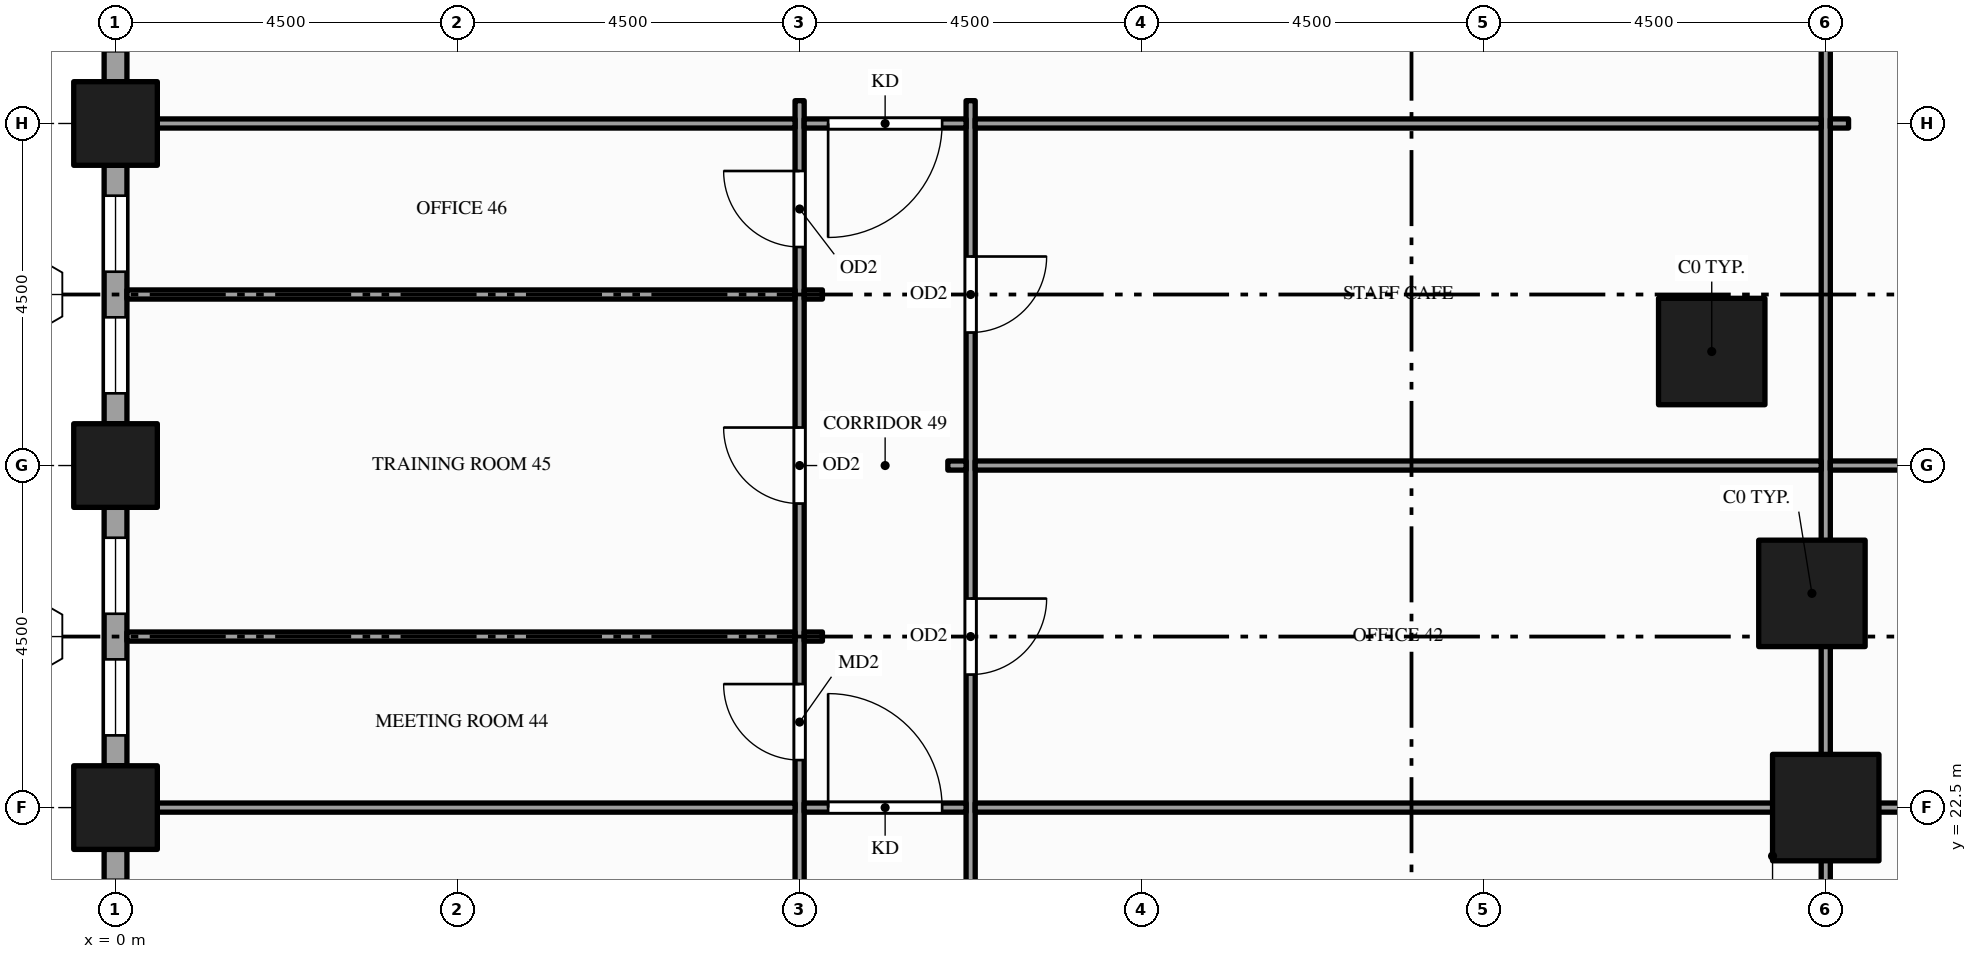
"""IFC4 building model, lengths in metres.
Left out: names, types, materials, properties, quantities, classifications, styles, units other than length and angle.
Written with IfcOpenShell. Run it as: python <this file> out.ifc"""

import sys

from ifc_helpers import new_model, si_unit, direction, frame, frame_2d, origin, origin_2d, place, context, subcontext, project, spatial, rectangle, hollow_rectangle, extrude, element, fill, save


model = new_model("IFC4")
c1 = context("Model", 3, precision=1e-05, world=origin(), true_north=direction((0.0, 1.0)))
c2 = subcontext(c1, "Body", "Model", "MODEL_VIEW")
j1 = project(units=[si_unit("LENGTHUNIT", "METRE"), si_unit("PLANEANGLEUNIT", "RADIAN")], contexts=[c1])
p1 = place(None, origin())
s1 = spatial("IfcSite", under=j1, at=p1, CompositionType="ELEMENT")
p2 = place(p1, origin())
s2 = spatial("IfcBuilding", under=s1, at=p2, CompositionType="ELEMENT")
p3 = place(p2, frame((0.0, 0.0, 8.0)))
s3 = spatial("IfcBuildingStorey", under=s2, at=p3, CompositionType="ELEMENT", Elevation=8.0)
for number, where, z_axis, x_axis in (
    (1, (0.0, 22.5, -0.25), (0.0, 0.0, 1.0), (1.0, 0.0, 0.0)),
    (2, (0.0, 27.0, -0.25), (0.0, 0.0, 1.0), (1.0, 0.0, 0.0)),
    (3, (0.0, 31.5, -0.25), (0.0, 0.0, 1.0), (1.0, 0.0, 0.0)),
):
    element("IfcColumn", number, at=place(p3, frame(where, z_axis=z_axis, x_axis=x_axis)), inside=s3, PredefinedType="COLUMN", context=c2, shape_type="SweptSolid", body=[
        extrude(hollow_rectangle(XDim=1.1, YDim=1.1, WallThickness=0.06, at=origin_2d()), origin(), (0.0, 0.0, 1.0), 6.0),
    ])
for number, where, z_axis, x_axis in (
    (4, (21.0, 28.5, -0.25), (0.0, 0.0, 1.0), (1.0, 0.0, 0.0)),
    (5, (22.318, 25.318, -0.25), (0.0, 0.0, 1.0), (1.0, 0.0, 0.0)),
    (6, (22.5, 22.5, -0.25), (0.0, 0.0, 1.0), (1.0, 0.0, 0.0)),
):
    element("IfcColumn", number, at=place(p3, frame(where, z_axis=z_axis, x_axis=x_axis)), inside=s3, PredefinedType="COLUMN", context=c2, shape_type="SweptSolid", body=[
        extrude(hollow_rectangle(XDim=1.4, YDim=1.4, WallThickness=0.08, at=origin_2d()), origin(), (0.0, 0.0, 1.0), 6.0),
    ])
p4 = place(p3, frame((0.0, 35.999, 0.0), z_axis=(0.0, 0.0, 1.0), x_axis=(0.0, -1.0, 0.0)))
e7 = element("IfcWall", 7, at=p4, inside=s3, PredefinedType="STANDARD", context=c2, shape_type="SweptSolid", body=[
    extrude(rectangle(XDim=3.949, YDim=0.3, at=frame_2d((1.975, 0.0))), origin(), (0.0, 0.0, 1.0), 5.036),
])
p5 = place(p4, frame((0.425, 0.0, 0.9)))
e8 = element("IfcOpeningElement", 8, at=p5, cuts=e7, PredefinedType="OPENING", context=c2, shape_type="SweptSolid", body=[
    extrude(rectangle(XDim=1.5, YDim=3.5, at=frame_2d((0.75, 1.75))), frame((0.0, 0.16, 0.0), z_axis=(0.0, -1.0, 0.0), x_axis=(1.0, 0.0, 0.0)), (0.0, 0.0, 1.0), 0.32),
])
p6 = place(p4, frame((2.549, 0.0, 0.9)))
e9 = element("IfcOpeningElement", 9, at=p6, cuts=e7, PredefinedType="OPENING", context=c2, shape_type="SweptSolid", body=[
    extrude(rectangle(XDim=1.0, YDim=3.5, at=frame_2d((0.5, 1.75))), frame((0.0, 0.16, 0.0), z_axis=(0.0, -1.0, 0.0), x_axis=(1.0, 0.0, 0.0)), (0.0, 0.0, 1.0), 0.32),
])
p7 = place(p3, frame((0.0, 30.95, 0.0), z_axis=(0.0, 0.0, 1.0), x_axis=(0.0, -1.0, 0.0)))
e10 = element("IfcWall", 10, at=p7, inside=s3, PredefinedType="STANDARD", context=c2, shape_type="SweptSolid", body=[
    extrude(rectangle(XDim=3.4, YDim=0.3, at=frame_2d((1.7, 0.0))), origin(), (0.0, 0.0, 1.0), 5.036),
])
p8 = place(p7, frame((0.4, 0.0, 0.9)))
e11 = element("IfcOpeningElement", 11, at=p8, cuts=e10, PredefinedType="OPENING", context=c2, shape_type="SweptSolid", body=[
    extrude(rectangle(XDim=1.0, YDim=3.5, at=frame_2d((0.5, 1.75))), frame((0.0, 0.16, 0.0), z_axis=(0.0, -1.0, 0.0), x_axis=(1.0, 0.0, 0.0)), (0.0, 0.0, 1.0), 0.32),
])
p9 = place(p7, frame((2.0, 0.0, 0.9)))
e12 = element("IfcOpeningElement", 12, at=p9, cuts=e10, PredefinedType="OPENING", context=c2, shape_type="SweptSolid", body=[
    extrude(rectangle(XDim=1.0, YDim=3.5, at=frame_2d((0.5, 1.75))), frame((0.0, 0.16, 0.0), z_axis=(0.0, -1.0, 0.0), x_axis=(1.0, 0.0, 0.0)), (0.0, 0.0, 1.0), 0.32),
])
p10 = place(p3, frame((0.0, 26.45, 0.0), z_axis=(0.0, 0.0, 1.0), x_axis=(0.0, -1.0, 0.0)))
e13 = element("IfcWall", 13, at=p10, inside=s3, PredefinedType="STANDARD", context=c2, shape_type="SweptSolid", body=[
    extrude(rectangle(XDim=3.4, YDim=0.3, at=frame_2d((1.7, 0.0))), origin(), (0.0, 0.0, 1.0), 5.036),
])
p11 = place(p10, frame((0.4, 0.0, 0.9)))
e14 = element("IfcOpeningElement", 14, at=p11, cuts=e13, PredefinedType="OPENING", context=c2, shape_type="SweptSolid", body=[
    extrude(rectangle(XDim=1.0, YDim=3.5, at=frame_2d((0.5, 1.75))), frame((0.0, 0.16, 0.0), z_axis=(0.0, -1.0, 0.0), x_axis=(1.0, 0.0, 0.0)), (0.0, 0.0, 1.0), 0.32),
])
p12 = place(p10, frame((2.0, 0.0, 0.9)))
e15 = element("IfcOpeningElement", 15, at=p12, cuts=e13, PredefinedType="OPENING", context=c2, shape_type="SweptSolid", body=[
    extrude(rectangle(XDim=1.0, YDim=3.5, at=frame_2d((0.5, 1.75))), frame((0.0, 0.16, 0.0), z_axis=(0.0, -1.0, 0.0), x_axis=(1.0, 0.0, 0.0)), (0.0, 0.0, 1.0), 0.32),
])
p13 = place(p3, frame((0.0, 21.95, 0.0), z_axis=(0.0, 0.0, 1.0), x_axis=(0.0, -1.0, 0.0)))
e16 = element("IfcWall", 16, at=p13, inside=s3, PredefinedType="STANDARD", context=c2, shape_type="SweptSolid", body=[
    extrude(rectangle(XDim=3.4, YDim=0.3, at=frame_2d((1.7, 0.0))), origin(), (0.0, 0.0, 1.0), 5.036),
])
p14 = place(p13, frame((0.4, 0.0, 0.9)))
e17 = element("IfcOpeningElement", 17, at=p14, cuts=e16, PredefinedType="OPENING", context=c2, shape_type="SweptSolid", body=[
    extrude(rectangle(XDim=1.0, YDim=3.5, at=frame_2d((0.5, 1.75))), frame((0.0, 0.16, 0.0), z_axis=(0.0, -1.0, 0.0), x_axis=(1.0, 0.0, 0.0)), (0.0, 0.0, 1.0), 0.32),
])
p15 = place(p13, frame((2.0, 0.0, 0.9)))
e18 = element("IfcOpeningElement", 18, at=p15, cuts=e16, PredefinedType="OPENING", context=c2, shape_type="SweptSolid", body=[
    extrude(rectangle(XDim=1.0, YDim=3.5, at=frame_2d((0.5, 1.75))), frame((0.0, 0.16, 0.0), z_axis=(0.0, -1.0, 0.0), x_axis=(1.0, 0.0, 0.0)), (0.0, 0.0, 1.0), 0.32),
])
p16 = place(p3, frame((9.0, 10.95, 0.0), z_axis=(0.0, 0.0, 1.0), x_axis=(0.0, 1.0, 0.0)))
e19 = element("IfcWall", 19, at=p16, inside=s3, PredefinedType="PARTITIONING", context=c2, shape_type="SweptSolid", body=[
    extrude(rectangle(XDim=20.85, YDim=0.12, at=frame_2d((10.425, 0.0))), origin(), (0.0, 0.0, 1.0), 4.5),
])
p17 = place(p16, frame((12.175, 0.0, 0.0)))
e20 = element("IfcOpeningElement", 20, at=p17, cuts=e19, PredefinedType="OPENING", context=c2, shape_type="SweptSolid", body=[
    extrude(rectangle(XDim=1.0, YDim=2.1, at=frame_2d((0.5, 1.05))), frame((0.0, 0.07, 0.0), z_axis=(0.0, -1.0, 0.0), x_axis=(1.0, 0.0, 0.0)), (0.0, 0.0, 1.0), 0.14),
])
p18 = place(p16, frame((15.55, 0.0, 0.0)))
e21 = element("IfcOpeningElement", 21, at=p18, cuts=e19, PredefinedType="OPENING", context=c2, shape_type="SweptSolid", body=[
    extrude(rectangle(XDim=1.0, YDim=2.1, at=frame_2d((0.5, 1.05))), frame((0.0, 0.07, 0.0), z_axis=(0.0, -1.0, 0.0), x_axis=(1.0, 0.0, 0.0)), (0.0, 0.0, 1.0), 0.14),
])
p19 = place(p16, frame((18.925, 0.0, 0.0)))
e22 = element("IfcOpeningElement", 22, at=p19, cuts=e19, PredefinedType="OPENING", context=c2, shape_type="SweptSolid", body=[
    extrude(rectangle(XDim=1.0, YDim=2.1, at=frame_2d((0.5, 1.05))), frame((0.0, 0.07, 0.0), z_axis=(0.0, -1.0, 0.0), x_axis=(1.0, 0.0, 0.0)), (0.0, 0.0, 1.0), 0.14),
])
p20 = place(p3, frame((11.25, 10.95, 0.0), z_axis=(0.0, 0.0, 1.0), x_axis=(0.0, 1.0, 0.0)))
e23 = element("IfcWall", 23, at=p20, inside=s3, PredefinedType="PARTITIONING", context=c2, shape_type="SweptSolid", body=[
    extrude(rectangle(XDim=20.85, YDim=0.12, at=frame_2d((10.425, 0.0))), origin(), (0.0, 0.0, 1.0), 4.5),
])
p21 = place(p20, frame((5.425, 0.0, 0.0)))
e24 = element("IfcOpeningElement", 24, at=p21, cuts=e23, PredefinedType="OPENING", context=c2, shape_type="SweptSolid", body=[
    extrude(rectangle(XDim=1.0, YDim=2.1, at=frame_2d((0.5, 1.05))), frame((0.0, 0.07, 0.0), z_axis=(0.0, -1.0, 0.0), x_axis=(1.0, 0.0, 0.0)), (0.0, 0.0, 1.0), 0.14),
])
p22 = place(p20, frame((13.3, 0.0, 0.0)))
e25 = element("IfcOpeningElement", 25, at=p22, cuts=e23, PredefinedType="OPENING", context=c2, shape_type="SweptSolid", body=[
    extrude(rectangle(XDim=1.0, YDim=2.1, at=frame_2d((0.5, 1.05))), frame((0.0, 0.07, 0.0), z_axis=(0.0, -1.0, 0.0), x_axis=(1.0, 0.0, 0.0)), (0.0, 0.0, 1.0), 0.14),
])
p23 = place(p20, frame((17.8, 0.0, 0.0)))
e26 = element("IfcOpeningElement", 26, at=p23, cuts=e23, PredefinedType="OPENING", context=c2, shape_type="SweptSolid", body=[
    extrude(rectangle(XDim=1.0, YDim=2.1, at=frame_2d((0.5, 1.05))), frame((0.0, 0.07, 0.0), z_axis=(0.0, -1.0, 0.0), x_axis=(1.0, 0.0, 0.0)), (0.0, 0.0, 1.0), 0.14),
])
p24 = place(p3, frame((22.5, 0.15, 0.0), z_axis=(0.0, 0.0, 1.0), x_axis=(0.0, 1.0, 0.0)))
e27 = element("IfcWall", 27, at=p24, inside=s3, PredefinedType="PARTITIONING", context=c2, shape_type="SweptSolid", body=[
    extrude(rectangle(XDim=35.95, YDim=0.12, at=frame_2d((17.975, 0.0))), origin(), (0.0, 0.0, 1.0), 4.759),
])
p25 = place(p24, frame((9.225, 0.0, 0.0)))
e28 = element("IfcOpeningElement", 28, at=p25, cuts=e27, PredefinedType="OPENING", context=c2, shape_type="SweptSolid", body=[
    extrude(rectangle(XDim=1.5, YDim=2.1, at=frame_2d((0.75, 1.05))), frame((0.0, 0.07, 0.0), z_axis=(0.0, -1.0, 0.0), x_axis=(1.0, 0.0, 0.0)), (0.0, 0.0, 1.0), 0.14),
])
p26 = place(p24, frame((32.7, 0.0, 0.0)))
e29 = element("IfcOpeningElement", 29, at=p26, cuts=e27, PredefinedType="OPENING", context=c2, shape_type="SweptSolid", body=[
    extrude(rectangle(XDim=1.8, YDim=2.1, at=frame_2d((0.9, 1.05))), frame((0.0, 0.07, 0.0), z_axis=(0.0, -1.0, 0.0), x_axis=(1.0, 0.0, 0.0)), (0.0, 0.0, 1.0), 0.14),
])
p27 = place(p3, frame((0.15, 22.5, 0.0), z_axis=(0.0, 0.0, 1.0), x_axis=(1.0, 0.0, 0.0)))
e30 = element("IfcWall", 30, at=p27, inside=s3, PredefinedType="PARTITIONING", context=c2, shape_type="SweptSolid", body=[
    extrude(rectangle(XDim=8.79, YDim=0.12, at=frame_2d((4.395, 0.0))), origin(), (0.0, 0.0, 1.0), 4.5),
])
p28 = place(p3, frame((9.06, 22.5, 0.0), z_axis=(0.0, 0.0, 1.0), x_axis=(1.0, 0.0, 0.0)))
e31 = element("IfcWall", 31, at=p28, inside=s3, PredefinedType="PARTITIONING", context=c2, shape_type="SweptSolid", body=[
    extrude(rectangle(XDim=2.13, YDim=0.12, at=frame_2d((1.065, 0.0))), origin(), (0.0, 0.0, 1.0), 4.5),
])
p29 = place(p28, frame((0.315, 0.0, 0.0)))
e32 = element("IfcOpeningElement", 32, at=p29, cuts=e31, PredefinedType="OPENING", context=c2, shape_type="SweptSolid", body=[
    extrude(rectangle(XDim=1.5, YDim=2.1, at=frame_2d((0.75, 1.05))), frame((0.0, 0.07, 0.0), z_axis=(0.0, -1.0, 0.0), x_axis=(1.0, 0.0, 0.0)), (0.0, 0.0, 1.0), 0.14),
])
p30 = place(p3, frame((11.31, 22.5, 0.0), z_axis=(0.0, 0.0, 1.0), x_axis=(1.0, 0.0, 0.0)))
e33 = element("IfcWall", 33, at=p30, inside=s3, PredefinedType="PARTITIONING", context=c2, shape_type="SweptSolid", body=[
    extrude(rectangle(XDim=11.13, YDim=0.12, at=frame_2d((5.565, 0.0))), origin(), (0.0, 0.0, 1.0), 4.5),
])
p31 = place(p3, frame((22.56, 22.5, 0.0), z_axis=(0.0, 0.0, 1.0), x_axis=(1.0, 0.0, 0.0)))
e34 = element("IfcWall", 34, at=p31, inside=s3, PredefinedType="PARTITIONING", context=c2, shape_type="SweptSolid", body=[
    extrude(rectangle(XDim=8.88, YDim=0.12, at=frame_2d((4.44, 0.0))), origin(), (0.0, 0.0, 1.0), 4.66),
])
p32 = place(p3, frame((0.15, 24.75, 0.0), z_axis=(0.0, 0.0, 1.0), x_axis=(1.0, 0.0, 0.0)))
e35 = element("IfcWall", 35, at=p32, inside=s3, PredefinedType="PARTITIONING", context=c2, shape_type="SweptSolid", body=[
    extrude(rectangle(XDim=8.79, YDim=0.12, at=frame_2d((4.395, 0.0))), origin(), (0.0, 0.0, 1.0), 4.759),
])
for number, where, z_axis, x_axis in (
    (36, (9.06, 24.75, 0.0), (0.0, 0.0, 1.0), (1.0, 0.0, 0.0)),
    (37, (10.95, 27.0, 0.0), (0.0, 0.0, 1.0), (1.0, 0.0, 0.0)),
):
    element("IfcWall", number, at=place(p3, frame(where, z_axis=z_axis, x_axis=x_axis)), inside=s3, PredefinedType="PARTITIONING", context=c2, shape_type="SweptSolid", body=[
        extrude(rectangle(XDim=0.24, YDim=0.12, at=frame_2d((0.12, 0.0))), origin(), (0.0, 0.0, 1.0), 4.759),
    ])
p33 = place(p3, frame((11.31, 27.0, 0.0), z_axis=(0.0, 0.0, 1.0), x_axis=(1.0, 0.0, 0.0)))
e38 = element("IfcWall", 38, at=p33, inside=s3, PredefinedType="PARTITIONING", context=c2, shape_type="SweptSolid", body=[
    extrude(rectangle(XDim=11.13, YDim=0.12, at=frame_2d((5.565, 0.0))), origin(), (0.0, 0.0, 1.0), 4.5),
])
p34 = place(p3, frame((22.56, 27.0, 0.0), z_axis=(0.0, 0.0, 1.0), x_axis=(1.0, 0.0, 0.0)))
e39 = element("IfcWall", 39, at=p34, inside=s3, PredefinedType="PARTITIONING", context=c2, shape_type="SweptSolid", body=[
    extrude(rectangle(XDim=4.14, YDim=0.12, at=frame_2d((2.07, 0.0))), origin(), (0.0, 0.0, 1.0), 4.66),
])
p35 = place(p34, frame((1.27, 0.0, 0.0)))
e40 = element("IfcOpeningElement", 40, at=p35, cuts=e39, PredefinedType="OPENING", context=c2, shape_type="SweptSolid", body=[
    extrude(rectangle(XDim=1.8, YDim=2.1, at=frame_2d((0.9, 1.05))), frame((0.0, 0.07, 0.0), z_axis=(0.0, -1.0, 0.0), x_axis=(1.0, 0.0, 0.0)), (0.0, 0.0, 1.0), 0.14),
])
p36 = place(p3, frame((0.15, 29.25, 0.0), z_axis=(0.0, 0.0, 1.0), x_axis=(1.0, 0.0, 0.0)))
e41 = element("IfcWall", 41, at=p36, inside=s3, PredefinedType="PARTITIONING", context=c2, shape_type="SweptSolid", body=[
    extrude(rectangle(XDim=8.79, YDim=0.12, at=frame_2d((4.395, 0.0))), origin(), (0.0, 0.0, 1.0), 4.759),
])
p37 = place(p3, frame((9.06, 29.25, 0.0), z_axis=(0.0, 0.0, 1.0), x_axis=(1.0, 0.0, 0.0)))
e42 = element("IfcWall", 42, at=p37, inside=s3, PredefinedType="PARTITIONING", context=c2, shape_type="SweptSolid", body=[
    extrude(rectangle(XDim=0.24, YDim=0.12, at=frame_2d((0.12, 0.0))), origin(), (0.0, 0.0, 1.0), 4.759),
])
p38 = place(p3, frame((0.15, 31.5, 0.0), z_axis=(0.0, 0.0, 1.0), x_axis=(1.0, 0.0, 0.0)))
e43 = element("IfcWall", 43, at=p38, inside=s3, PredefinedType="PARTITIONING", context=c2, shape_type="SweptSolid", body=[
    extrude(rectangle(XDim=8.79, YDim=0.12, at=frame_2d((4.395, 0.0))), origin(), (0.0, 0.0, 1.0), 4.759),
])
p39 = place(p3, frame((9.06, 31.5, 0.0), z_axis=(0.0, 0.0, 1.0), x_axis=(1.0, 0.0, 0.0)))
e44 = element("IfcWall", 44, at=p39, inside=s3, PredefinedType="PARTITIONING", context=c2, shape_type="SweptSolid", body=[
    extrude(rectangle(XDim=2.13, YDim=0.12, at=frame_2d((1.065, 0.0))), origin(), (0.0, 0.0, 1.0), 4.759),
])
p40 = place(p39, frame((0.315, 0.0, 0.0)))
e45 = element("IfcOpeningElement", 45, at=p40, cuts=e44, PredefinedType="OPENING", context=c2, shape_type="SweptSolid", body=[
    extrude(rectangle(XDim=1.5, YDim=2.1, at=frame_2d((0.75, 1.05))), frame((0.0, 0.07, 0.0), z_axis=(0.0, -1.0, 0.0), x_axis=(1.0, 0.0, 0.0)), (0.0, 0.0, 1.0), 0.14),
])
p41 = place(p3, frame((11.31, 31.5, 0.0), z_axis=(0.0, 0.0, 1.0), x_axis=(1.0, 0.0, 0.0)))
e46 = element("IfcWall", 46, at=p41, inside=s3, PredefinedType="PARTITIONING", context=c2, shape_type="SweptSolid", body=[
    extrude(rectangle(XDim=11.13, YDim=0.12, at=frame_2d((5.565, 0.0))), origin(), (0.0, 0.0, 1.0), 4.5),
])
p42 = place(p3, frame((22.56, 31.5, 0.0), z_axis=(0.0, 0.0, 1.0), x_axis=(1.0, 0.0, 0.0)))
e47 = element("IfcWall", 47, at=p42, inside=s3, PredefinedType="PARTITIONING", context=c2, shape_type="SweptSolid", body=[
    extrude(rectangle(XDim=0.24, YDim=0.12, at=frame_2d((0.12, 0.0))), origin(), (0.0, 0.0, 1.0), 4.759),
])
p43 = place(p8, origin())
e48 = element("IfcWindow", 48, at=p43, inside=s3, PartitioningType="SINGLE_PANEL", PredefinedType="WINDOW", context=c2, shape_type="SweptSolid", body=[
    extrude(rectangle(XDim=1.0, YDim=3.5, at=frame_2d((0.5, 1.75))), frame((0.0, 0.03, 0.0), z_axis=(0.0, -1.0, 0.0), x_axis=(1.0, 0.0, 0.0)), (0.0, 0.0, 1.0), 0.06),
])
fill(e11, e48)
p44 = place(p9, origin())
e49 = element("IfcWindow", 49, at=p44, inside=s3, PartitioningType="SINGLE_PANEL", PredefinedType="WINDOW", context=c2, shape_type="SweptSolid", body=[
    extrude(rectangle(XDim=1.0, YDim=3.5, at=frame_2d((0.5, 1.75))), frame((0.0, 0.03, 0.0), z_axis=(0.0, -1.0, 0.0), x_axis=(1.0, 0.0, 0.0)), (0.0, 0.0, 1.0), 0.06),
])
fill(e12, e49)
p45 = place(p11, origin())
e50 = element("IfcWindow", 50, at=p45, inside=s3, PartitioningType="SINGLE_PANEL", PredefinedType="WINDOW", context=c2, shape_type="SweptSolid", body=[
    extrude(rectangle(XDim=1.0, YDim=3.5, at=frame_2d((0.5, 1.75))), frame((0.0, 0.03, 0.0), z_axis=(0.0, -1.0, 0.0), x_axis=(1.0, 0.0, 0.0)), (0.0, 0.0, 1.0), 0.06),
])
fill(e14, e50)
p46 = place(p12, origin())
e51 = element("IfcWindow", 51, at=p46, inside=s3, PartitioningType="SINGLE_PANEL", PredefinedType="WINDOW", context=c2, shape_type="SweptSolid", body=[
    extrude(rectangle(XDim=1.0, YDim=3.5, at=frame_2d((0.5, 1.75))), frame((0.0, 0.03, 0.0), z_axis=(0.0, -1.0, 0.0), x_axis=(1.0, 0.0, 0.0)), (0.0, 0.0, 1.0), 0.06),
])
fill(e15, e51)
p47 = place(p29, origin())
e52 = element("IfcDoor", 52, at=p47, inside=s3, OperationType="SINGLE_SWING_LEFT", PredefinedType="DOOR", context=c2, shape_type="SweptSolid", body=[
    extrude(rectangle(XDim=1.5, YDim=2.1, at=frame_2d((0.75, 1.05))), frame((0.0, 0.025, 0.0), z_axis=(0.0, -1.0, 0.0), x_axis=(1.0, 0.0, 0.0)), (0.0, 0.0, 1.0), 0.05),
])
fill(e32, e52)
p48 = place(p40, origin())
e53 = element("IfcDoor", 53, at=p48, inside=s3, OperationType="SINGLE_SWING_LEFT", PredefinedType="DOOR", context=c2, shape_type="SweptSolid", body=[
    extrude(rectangle(XDim=1.5, YDim=2.1, at=frame_2d((0.75, 1.05))), frame((0.0, 0.025, 0.0), z_axis=(0.0, -1.0, 0.0), x_axis=(1.0, 0.0, 0.0)), (0.0, 0.0, 1.0), 0.05),
])
fill(e45, e53)
p49 = place(p17, origin())
e54 = element("IfcDoor", 54, at=p49, inside=s3, OperationType="SINGLE_SWING_RIGHT", PredefinedType="DOOR", context=c2, shape_type="SweptSolid", body=[
    extrude(rectangle(XDim=1.0, YDim=2.1, at=frame_2d((0.5, 1.05))), frame((0.0, 0.025, 0.0), z_axis=(0.0, -1.0, 0.0), x_axis=(1.0, 0.0, 0.0)), (0.0, 0.0, 1.0), 0.05),
])
fill(e20, e54)
p50 = place(p18, origin())
e55 = element("IfcDoor", 55, at=p50, inside=s3, OperationType="SINGLE_SWING_RIGHT", PredefinedType="DOOR", context=c2, shape_type="SweptSolid", body=[
    extrude(rectangle(XDim=1.0, YDim=2.1, at=frame_2d((0.5, 1.05))), frame((0.0, 0.025, 0.0), z_axis=(0.0, -1.0, 0.0), x_axis=(1.0, 0.0, 0.0)), (0.0, 0.0, 1.0), 0.05),
])
fill(e21, e55)
p51 = place(p19, origin())
e56 = element("IfcDoor", 56, at=p51, inside=s3, OperationType="SINGLE_SWING_RIGHT", PredefinedType="DOOR", context=c2, shape_type="SweptSolid", body=[
    extrude(rectangle(XDim=1.0, YDim=2.1, at=frame_2d((0.5, 1.05))), frame((0.0, 0.025, 0.0), z_axis=(0.0, -1.0, 0.0), x_axis=(1.0, 0.0, 0.0)), (0.0, 0.0, 1.0), 0.05),
])
fill(e22, e56)
p52 = place(p22, origin())
e57 = element("IfcDoor", 57, at=p52, inside=s3, OperationType="SINGLE_SWING_RIGHT", PredefinedType="DOOR", context=c2, shape_type="SweptSolid", body=[
    extrude(rectangle(XDim=1.0, YDim=2.1, at=frame_2d((0.5, 1.05))), frame((0.0, 0.025, 0.0), z_axis=(0.0, -1.0, 0.0), x_axis=(1.0, 0.0, 0.0)), (0.0, 0.0, 1.0), 0.05),
])
fill(e25, e57)
p53 = place(p23, origin())
e58 = element("IfcDoor", 58, at=p53, inside=s3, OperationType="SINGLE_SWING_RIGHT", PredefinedType="DOOR", context=c2, shape_type="SweptSolid", body=[
    extrude(rectangle(XDim=1.0, YDim=2.1, at=frame_2d((0.5, 1.05))), frame((0.0, 0.025, 0.0), z_axis=(0.0, -1.0, 0.0), x_axis=(1.0, 0.0, 0.0)), (0.0, 0.0, 1.0), 0.05),
])
fill(e26, e58)
save(model, sys.argv[1])
